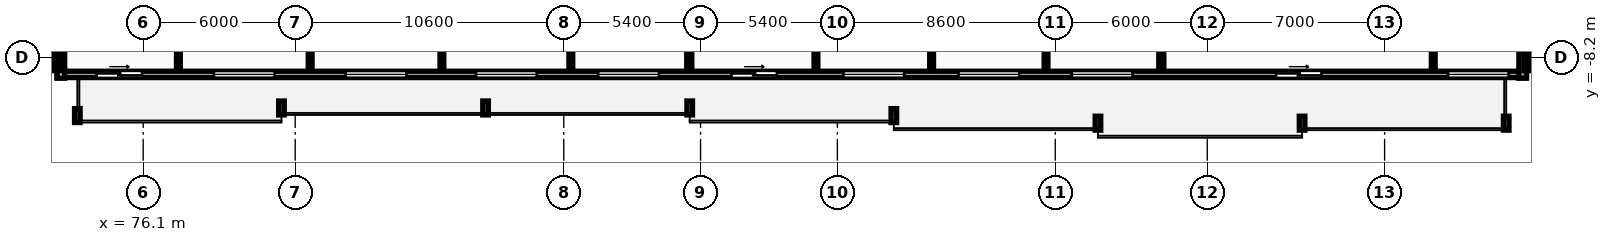
"""IFC4 building model, lengths in metres.
Left out: names, types, materials, properties, quantities, classifications, styles, units other than length and angle.
Written with IfcOpenShell. Run it as: python <this file> out.ifc"""

import sys

from ifc_helpers import new_model, si_unit, direction, frame, frame_2d, origin, place, context, subcontext, project, spatial, rectangle, extrude, element, fill, save


model = new_model("IFC4")
c1 = context("Model", 3, precision=1e-05, world=origin(), true_north=direction((0.0, 1.0)))
c2 = subcontext(c1, "Body", "Model", "MODEL_VIEW")
j1 = project(units=[si_unit("LENGTHUNIT", "METRE"), si_unit("PLANEANGLEUNIT", "RADIAN")], contexts=[c1])
p1 = place(None, origin())
s1 = spatial("IfcSite", under=j1, at=p1, CompositionType="ELEMENT")
p2 = place(p1, origin())
s2 = spatial("IfcBuilding", under=s1, at=p2, CompositionType="ELEMENT")
p3 = place(p2, frame((0.0, 0.0, 132.8)))
s3 = spatial("IfcBuildingStorey", under=s2, at=p3, CompositionType="ELEMENT", Elevation=132.8)
p4 = place(p3, frame((72.7, -8.85, 0.0), z_axis=(0.0, 0.0, 1.0), x_axis=(1.0, 0.0, 0.0)))
e1 = element("IfcWall", 1, at=p4, inside=s3, PredefinedType="STANDARD", context=c2, shape_type="SweptSolid", body=[
    extrude(rectangle(XDim=58.0, YDim=0.25, at=frame_2d((29.0, 0.0))), origin(), (0.0, 0.0, 1.0), 2.97),
])
p5 = place(p4, frame((6.19, 0.0, 0.85)))
e2 = element("IfcOpeningElement", 2, at=p5, cuts=e1, PredefinedType="OPENING", context=c2, shape_type="SweptSolid", body=[
    extrude(rectangle(XDim=2.4, YDim=1.9, at=frame_2d((1.2, 0.95))), frame((0.0, 0.135, 0.0), z_axis=(0.0, -1.0, 0.0), x_axis=(1.0, 0.0, 0.0)), (0.0, 0.0, 1.0), 0.27),
])
p6 = place(p4, frame((11.39, 0.0, 0.85)))
e3 = element("IfcOpeningElement", 3, at=p6, cuts=e1, PredefinedType="OPENING", context=c2, shape_type="SweptSolid", body=[
    extrude(rectangle(XDim=2.4, YDim=1.9, at=frame_2d((1.2, 0.95))), frame((0.0, 0.135, 0.0), z_axis=(0.0, -1.0, 0.0), x_axis=(1.0, 0.0, 0.0)), (0.0, 0.0, 1.0), 0.27),
])
p7 = place(p4, frame((16.535, 0.0, 0.85)))
e4 = element("IfcOpeningElement", 4, at=p7, cuts=e1, PredefinedType="OPENING", context=c2, shape_type="SweptSolid", body=[
    extrude(rectangle(XDim=2.4, YDim=1.9, at=frame_2d((1.2, 0.95))), frame((0.0, 0.135, 0.0), z_axis=(0.0, -1.0, 0.0), x_axis=(1.0, 0.0, 0.0)), (0.0, 0.0, 1.0), 0.27),
])
p8 = place(p4, frame((1.555, 0.0, 0.0)))
e5 = element("IfcOpeningElement", 5, at=p8, cuts=e1, PredefinedType="OPENING", context=c2, shape_type="SweptSolid", body=[
    extrude(rectangle(XDim=1.8, YDim=2.2, at=frame_2d((0.9, 1.1))), frame((0.0, 0.135, 0.0), z_axis=(0.0, -1.0, 0.0), x_axis=(1.0, 0.0, 0.0)), (0.0, 0.0, 1.0), 0.27),
])
p9 = place(p4, frame((21.357, 0.0, 0.85)))
e6 = element("IfcOpeningElement", 6, at=p9, cuts=e1, PredefinedType="OPENING", context=c2, shape_type="SweptSolid", body=[
    extrude(rectangle(XDim=2.4, YDim=1.9, at=frame_2d((1.2, 0.95))), frame((0.0, 0.135, 0.0), z_axis=(0.0, -1.0, 0.0), x_axis=(1.0, 0.0, 0.0)), (0.0, 0.0, 1.0), 0.27),
])
p10 = place(p4, frame((31.037, 0.0, 0.85)))
e7 = element("IfcOpeningElement", 7, at=p10, cuts=e1, PredefinedType="OPENING", context=c2, shape_type="SweptSolid", body=[
    extrude(rectangle(XDim=2.4, YDim=1.9, at=frame_2d((1.2, 0.95))), frame((0.0, 0.135, 0.0), z_axis=(0.0, -1.0, 0.0), x_axis=(1.0, 0.0, 0.0)), (0.0, 0.0, 1.0), 0.27),
])
p11 = place(p4, frame((35.578, 0.0, 0.85)))
e8 = element("IfcOpeningElement", 8, at=p11, cuts=e1, PredefinedType="OPENING", context=c2, shape_type="SweptSolid", body=[
    extrude(rectangle(XDim=2.4, YDim=1.9, at=frame_2d((1.2, 0.95))), frame((0.0, 0.135, 0.0), z_axis=(0.0, -1.0, 0.0), x_axis=(1.0, 0.0, 0.0)), (0.0, 0.0, 1.0), 0.27),
])
p12 = place(p4, frame((26.615, 0.0, 0.0)))
e9 = element("IfcOpeningElement", 9, at=p12, cuts=e1, PredefinedType="OPENING", context=c2, shape_type="SweptSolid", body=[
    extrude(rectangle(XDim=1.8, YDim=2.2, at=frame_2d((0.9, 1.1))), frame((0.0, 0.135, 0.0), z_axis=(0.0, -1.0, 0.0), x_axis=(1.0, 0.0, 0.0)), (0.0, 0.0, 1.0), 0.27),
])
p13 = place(p4, frame((40.051, 0.0, 0.85)))
e10 = element("IfcOpeningElement", 10, at=p13, cuts=e1, PredefinedType="OPENING", context=c2, shape_type="SweptSolid", body=[
    extrude(rectangle(XDim=2.4, YDim=1.9, at=frame_2d((1.2, 0.95))), frame((0.0, 0.135, 0.0), z_axis=(0.0, -1.0, 0.0), x_axis=(1.0, 0.0, 0.0)), (0.0, 0.0, 1.0), 0.27),
])
p14 = place(p4, frame((48.113, 0.0, 0.0)))
e11 = element("IfcOpeningElement", 11, at=p14, cuts=e1, PredefinedType="OPENING", context=c2, shape_type="SweptSolid", body=[
    extrude(rectangle(XDim=1.8, YDim=2.2, at=frame_2d((0.9, 1.1))), frame((0.0, 0.135, 0.0), z_axis=(0.0, -1.0, 0.0), x_axis=(1.0, 0.0, 0.0)), (0.0, 0.0, 1.0), 0.27),
])
p15 = place(p4, frame((54.9, 0.0, 0.85)))
e12 = element("IfcOpeningElement", 12, at=p15, cuts=e1, PredefinedType="OPENING", context=c2, shape_type="SweptSolid", body=[
    extrude(rectangle(XDim=2.4, YDim=1.9, at=frame_2d((1.2, 0.95))), frame((0.0, 0.135, 0.0), z_axis=(0.0, -1.0, 0.0), x_axis=(1.0, 0.0, 0.0)), (0.0, 0.0, 1.0), 0.27),
])
for number, where, z_axis, x_axis in (
    (13, (130.55, -9.0, 0.0), (0.0, 0.0, 1.0), (0.0, 1.0, 0.0)),
    (14, (72.85, -5.4, 0.0), (0.0, 0.0, 1.0), (0.0, -1.0, 0.0)),
):
    element("IfcWall", number, at=place(p3, frame(where, z_axis=z_axis, x_axis=x_axis)), inside=s3, PredefinedType="STANDARD", context=c2, shape_type="SweptSolid", body=[
        extrude(rectangle(XDim=3.6, YDim=0.3, at=frame_2d((1.8, 0.0))), origin(), (0.0, 0.0, 1.0), 2.97),
    ])
for number, where, z_axis, x_axis in (
    (15, (72.7, -8.7, 0.0), (0.0, 0.0, 1.0), (0.0, 1.0, 0.0)),
    (16, (130.7, -8.7, 0.0), (0.0, 0.0, 1.0), (0.0, 1.0, 0.0)),
    (17, (97.655, -8.7, 0.0), (0.0, 0.0, 1.0), (0.0, 1.0, 0.0)),
):
    element("IfcWall", number, at=place(p3, frame(where, z_axis=z_axis, x_axis=x_axis)), inside=s3, PredefinedType="PARTITIONING", context=c2, shape_type="SweptSolid", body=[
        extrude(rectangle(XDim=24.57, YDim=0.2, at=frame_2d((12.285, 0.0))), origin(), (0.0, 0.0, 1.0), 2.97),
    ])
for number, where, z_axis, x_axis in (
    (18, (82.69, -8.7, 0.0), (0.0, 0.0, 1.0), (0.0, 1.0, 0.0)),
    (19, (87.89, -8.7, 0.0), (0.0, 0.0, 1.0), (0.0, 1.0, 0.0)),
):
    element("IfcWall", number, at=place(p3, frame(where, z_axis=z_axis, x_axis=x_axis)), inside=s3, PredefinedType="PARTITIONING", context=c2, shape_type="SweptSolid", body=[
        extrude(rectangle(XDim=4.47, YDim=0.15, at=frame_2d((2.235, 0.0))), origin(), (0.0, 0.0, 1.0), 2.97),
    ])
p16 = place(p3, frame((77.49, -8.7, 0.0), z_axis=(0.0, 0.0, 1.0), x_axis=(0.0, 1.0, 0.0)))
e20 = element("IfcWall", 20, at=p16, inside=s3, PredefinedType="PARTITIONING", context=c2, shape_type="SweptSolid", body=[
    extrude(rectangle(XDim=9.61, YDim=0.15, at=frame_2d((4.805, 0.0))), origin(), (0.0, 0.0, 1.0), 2.97),
])
p17 = place(p16, frame((4.87, 0.0, 0.0)))
e21 = element("IfcOpeningElement", 21, at=p17, cuts=e20, PredefinedType="OPENING", context=c2, shape_type="SweptSolid", body=[
    extrude(rectangle(XDim=0.92, YDim=2.08, at=frame_2d((0.46, 1.04))), frame((0.0, 0.085, 0.0), z_axis=(0.0, -1.0, 0.0), x_axis=(1.0, 0.0, 0.0)), (0.0, 0.0, 1.0), 0.17),
])
p18 = place(p3, frame((92.98, -8.7, 0.0), z_axis=(0.0, 0.0, 1.0), x_axis=(0.0, 1.0, 0.0)))
e22 = element("IfcWall", 22, at=p18, inside=s3, PredefinedType="PARTITIONING", context=c2, shape_type="SweptSolid", body=[
    extrude(rectangle(XDim=6.99, YDim=0.15, at=frame_2d((3.495, 0.0))), origin(), (0.0, 0.0, 1.0), 2.97),
])
p19 = place(p18, frame((5.81, 0.0, 0.0)))
e23 = element("IfcOpeningElement", 23, at=p19, cuts=e22, PredefinedType="OPENING", context=c2, shape_type="SweptSolid", body=[
    extrude(rectangle(XDim=0.92, YDim=2.08, at=frame_2d((0.46, 1.04))), frame((0.0, 0.085, 0.0), z_axis=(0.0, -1.0, 0.0), x_axis=(1.0, 0.0, 0.0)), (0.0, 0.0, 1.0), 0.17),
])
p20 = place(p3, frame((116.286, -8.7, 0.0), z_axis=(0.0, 0.0, 1.0), x_axis=(0.0, 1.0, 0.0)))
e24 = element("IfcWall", 24, at=p20, inside=s3, PredefinedType="PARTITIONING", context=c2, shape_type="SweptSolid", body=[
    extrude(rectangle(XDim=24.57, YDim=0.2, at=frame_2d((12.285, 0.0))), origin(), (0.0, 0.0, 1.0), 2.97),
])
p21 = place(p3, frame((107.22, -8.7, 0.0), z_axis=(0.0, 0.0, 1.0), x_axis=(0.0, 1.0, 0.0)))
e25 = element("IfcWall", 25, at=p21, inside=s3, PredefinedType="PARTITIONING", context=c2, shape_type="SweptSolid", body=[
    extrude(rectangle(XDim=4.47, YDim=0.15, at=frame_2d((2.235, 0.0))), origin(), (0.0, 0.0, 1.0), 2.97),
])
p22 = place(p3, frame((102.655, -8.7, 0.0), z_axis=(0.0, 0.0, 1.0), x_axis=(0.0, 1.0, 0.0)))
e26 = element("IfcWall", 26, at=p22, inside=s3, PredefinedType="PARTITIONING", context=c2, shape_type="SweptSolid", body=[
    extrude(rectangle(XDim=9.61, YDim=0.15, at=frame_2d((4.805, 0.0))), origin(), (0.0, 0.0, 1.0), 2.97),
])
p23 = place(p22, frame((5.92, 0.0, 0.0)))
e27 = element("IfcOpeningElement", 27, at=p23, cuts=e26, PredefinedType="OPENING", context=c2, shape_type="SweptSolid", body=[
    extrude(rectangle(XDim=0.92, YDim=2.08, at=frame_2d((0.46, 1.04))), frame((0.0, 0.085, 0.0), z_axis=(0.0, -1.0, 0.0), x_axis=(1.0, 0.0, 0.0)), (0.0, 0.0, 1.0), 0.17),
])
p24 = place(p3, frame((111.736, -8.7, 0.0), z_axis=(0.0, 0.0, 1.0), x_axis=(0.0, 1.0, 0.0)))
e28 = element("IfcWall", 28, at=p24, inside=s3, PredefinedType="PARTITIONING", context=c2, shape_type="SweptSolid", body=[
    extrude(rectangle(XDim=7.1, YDim=0.15, at=frame_2d((3.55, 0.0))), origin(), (0.0, 0.0, 1.0), 2.97),
])
p25 = place(p24, frame((4.87, 0.0, 0.0)))
e29 = element("IfcOpeningElement", 29, at=p25, cuts=e28, PredefinedType="OPENING", context=c2, shape_type="SweptSolid", body=[
    extrude(rectangle(XDim=0.92, YDim=2.08, at=frame_2d((0.46, 1.04))), frame((0.0, 0.085, 0.0), z_axis=(0.0, -1.0, 0.0), x_axis=(1.0, 0.0, 0.0)), (0.0, 0.0, 1.0), 0.17),
])
p26 = place(p3, frame((127.02, -8.7, 0.0), z_axis=(0.0, 0.0, 1.0), x_axis=(0.0, 1.0, 0.0)))
e30 = element("IfcWall", 30, at=p26, inside=s3, PredefinedType="PARTITIONING", context=c2, shape_type="SweptSolid", body=[
    extrude(rectangle(XDim=9.61, YDim=0.15, at=frame_2d((4.805, 0.0))), origin(), (0.0, 0.0, 1.0), 2.97),
])
p27 = place(p26, frame((6.065, 0.0, 0.0)))
e31 = element("IfcOpeningElement", 31, at=p27, cuts=e30, PredefinedType="OPENING", context=c2, shape_type="SweptSolid", body=[
    extrude(rectangle(XDim=0.84, YDim=2.04, at=frame_2d((0.42, 1.02))), frame((0.0, 0.085, 0.0), z_axis=(0.0, -1.0, 0.0), x_axis=(1.0, 0.0, 0.0)), (0.0, 0.0, 1.0), 0.17),
])
p28 = place(p26, frame((7.34, 0.0, 0.0)))
e32 = element("IfcOpeningElement", 32, at=p28, cuts=e30, PredefinedType="OPENING", context=c2, shape_type="SweptSolid", body=[
    extrude(rectangle(XDim=0.84, YDim=2.04, at=frame_2d((0.42, 1.02))), frame((0.0, 0.085, 0.0), z_axis=(0.0, -1.0, 0.0), x_axis=(1.0, 0.0, 0.0)), (0.0, 0.0, 1.0), 0.17),
])
p29 = place(p26, frame((1.971, 0.0, 0.0)))
e33 = element("IfcOpeningElement", 33, at=p29, cuts=e30, PredefinedType="OPENING", context=c2, shape_type="SweptSolid", body=[
    extrude(rectangle(XDim=0.88, YDim=2.06, at=frame_2d((0.44, 1.03))), frame((0.0, 0.085, 0.0), z_axis=(0.0, -1.0, 0.0), x_axis=(1.0, 0.0, 0.0)), (0.0, 0.0, 1.0), 0.17),
])
p30 = place(p5, origin())
e34 = element("IfcWindow", 34, at=p30, inside=s3, PartitioningType="DOUBLE_PANEL_VERTICAL", PredefinedType="WINDOW", context=c2, shape_type="SweptSolid", body=[
    extrude(rectangle(XDim=2.4, YDim=1.9, at=frame_2d((1.2, 0.95))), frame((0.0, 0.03, 0.0), z_axis=(0.0, -1.0, 0.0), x_axis=(1.0, 0.0, 0.0)), (0.0, 0.0, 1.0), 0.06),
])
fill(e2, e34)
p31 = place(p6, origin())
e35 = element("IfcWindow", 35, at=p31, inside=s3, PartitioningType="DOUBLE_PANEL_VERTICAL", PredefinedType="WINDOW", context=c2, shape_type="SweptSolid", body=[
    extrude(rectangle(XDim=2.4, YDim=1.9, at=frame_2d((1.2, 0.95))), frame((0.0, 0.03, 0.0), z_axis=(0.0, -1.0, 0.0), x_axis=(1.0, 0.0, 0.0)), (0.0, 0.0, 1.0), 0.06),
])
fill(e3, e35)
p32 = place(p7, origin())
e36 = element("IfcWindow", 36, at=p32, inside=s3, PartitioningType="DOUBLE_PANEL_VERTICAL", PredefinedType="WINDOW", context=c2, shape_type="SweptSolid", body=[
    extrude(rectangle(XDim=2.4, YDim=1.9, at=frame_2d((1.2, 0.95))), frame((0.0, 0.03, 0.0), z_axis=(0.0, -1.0, 0.0), x_axis=(1.0, 0.0, 0.0)), (0.0, 0.0, 1.0), 0.06),
])
fill(e4, e36)
p33 = place(p8, origin())
e37 = element("IfcDoor", 37, at=p33, inside=s3, OperationType="SLIDING_TO_RIGHT", PredefinedType="DOOR", context=c2, shape_type="SweptSolid", body=[
    extrude(rectangle(XDim=1.8, YDim=2.2, at=frame_2d((0.9, 1.1))), frame((0.0, 0.025, 0.0), z_axis=(0.0, -1.0, 0.0), x_axis=(1.0, 0.0, 0.0)), (0.0, 0.0, 1.0), 0.05),
])
fill(e5, e37)
p34 = place(p9, origin())
e38 = element("IfcWindow", 38, at=p34, inside=s3, PartitioningType="DOUBLE_PANEL_VERTICAL", PredefinedType="WINDOW", context=c2, shape_type="SweptSolid", body=[
    extrude(rectangle(XDim=2.4, YDim=1.9, at=frame_2d((1.2, 0.95))), frame((0.0, 0.03, 0.0), z_axis=(0.0, -1.0, 0.0), x_axis=(1.0, 0.0, 0.0)), (0.0, 0.0, 1.0), 0.06),
])
fill(e6, e38)
p35 = place(p10, origin())
e39 = element("IfcWindow", 39, at=p35, inside=s3, PartitioningType="DOUBLE_PANEL_VERTICAL", PredefinedType="WINDOW", context=c2, shape_type="SweptSolid", body=[
    extrude(rectangle(XDim=2.4, YDim=1.9, at=frame_2d((1.2, 0.95))), frame((0.0, 0.03, 0.0), z_axis=(0.0, -1.0, 0.0), x_axis=(1.0, 0.0, 0.0)), (0.0, 0.0, 1.0), 0.06),
])
fill(e7, e39)
p36 = place(p11, origin())
e40 = element("IfcWindow", 40, at=p36, inside=s3, PartitioningType="DOUBLE_PANEL_VERTICAL", PredefinedType="WINDOW", context=c2, shape_type="SweptSolid", body=[
    extrude(rectangle(XDim=2.4, YDim=1.9, at=frame_2d((1.2, 0.95))), frame((0.0, 0.03, 0.0), z_axis=(0.0, -1.0, 0.0), x_axis=(1.0, 0.0, 0.0)), (0.0, 0.0, 1.0), 0.06),
])
fill(e8, e40)
p37 = place(p12, origin())
e41 = element("IfcDoor", 41, at=p37, inside=s3, OperationType="SLIDING_TO_RIGHT", PredefinedType="DOOR", context=c2, shape_type="SweptSolid", body=[
    extrude(rectangle(XDim=1.8, YDim=2.2, at=frame_2d((0.9, 1.1))), frame((0.0, 0.025, 0.0), z_axis=(0.0, -1.0, 0.0), x_axis=(1.0, 0.0, 0.0)), (0.0, 0.0, 1.0), 0.05),
])
fill(e9, e41)
p38 = place(p13, origin())
e42 = element("IfcWindow", 42, at=p38, inside=s3, PartitioningType="DOUBLE_PANEL_VERTICAL", PredefinedType="WINDOW", context=c2, shape_type="SweptSolid", body=[
    extrude(rectangle(XDim=2.4, YDim=1.9, at=frame_2d((1.2, 0.95))), frame((0.0, 0.03, 0.0), z_axis=(0.0, -1.0, 0.0), x_axis=(1.0, 0.0, 0.0)), (0.0, 0.0, 1.0), 0.06),
])
fill(e10, e42)
p39 = place(p14, origin())
e43 = element("IfcDoor", 43, at=p39, inside=s3, OperationType="SLIDING_TO_RIGHT", PredefinedType="DOOR", context=c2, shape_type="SweptSolid", body=[
    extrude(rectangle(XDim=1.8, YDim=2.2, at=frame_2d((0.9, 1.1))), frame((0.0, 0.025, 0.0), z_axis=(0.0, -1.0, 0.0), x_axis=(1.0, 0.0, 0.0)), (0.0, 0.0, 1.0), 0.05),
])
fill(e11, e43)
p40 = place(p15, origin())
e44 = element("IfcWindow", 44, at=p40, inside=s3, PartitioningType="DOUBLE_PANEL_VERTICAL", PredefinedType="WINDOW", context=c2, shape_type="SweptSolid", body=[
    extrude(rectangle(XDim=2.4, YDim=1.9, at=frame_2d((1.2, 0.95))), frame((0.0, 0.03, 0.0), z_axis=(0.0, -1.0, 0.0), x_axis=(1.0, 0.0, 0.0)), (0.0, 0.0, 1.0), 0.06),
])
fill(e12, e44)
save(model, sys.argv[1])
